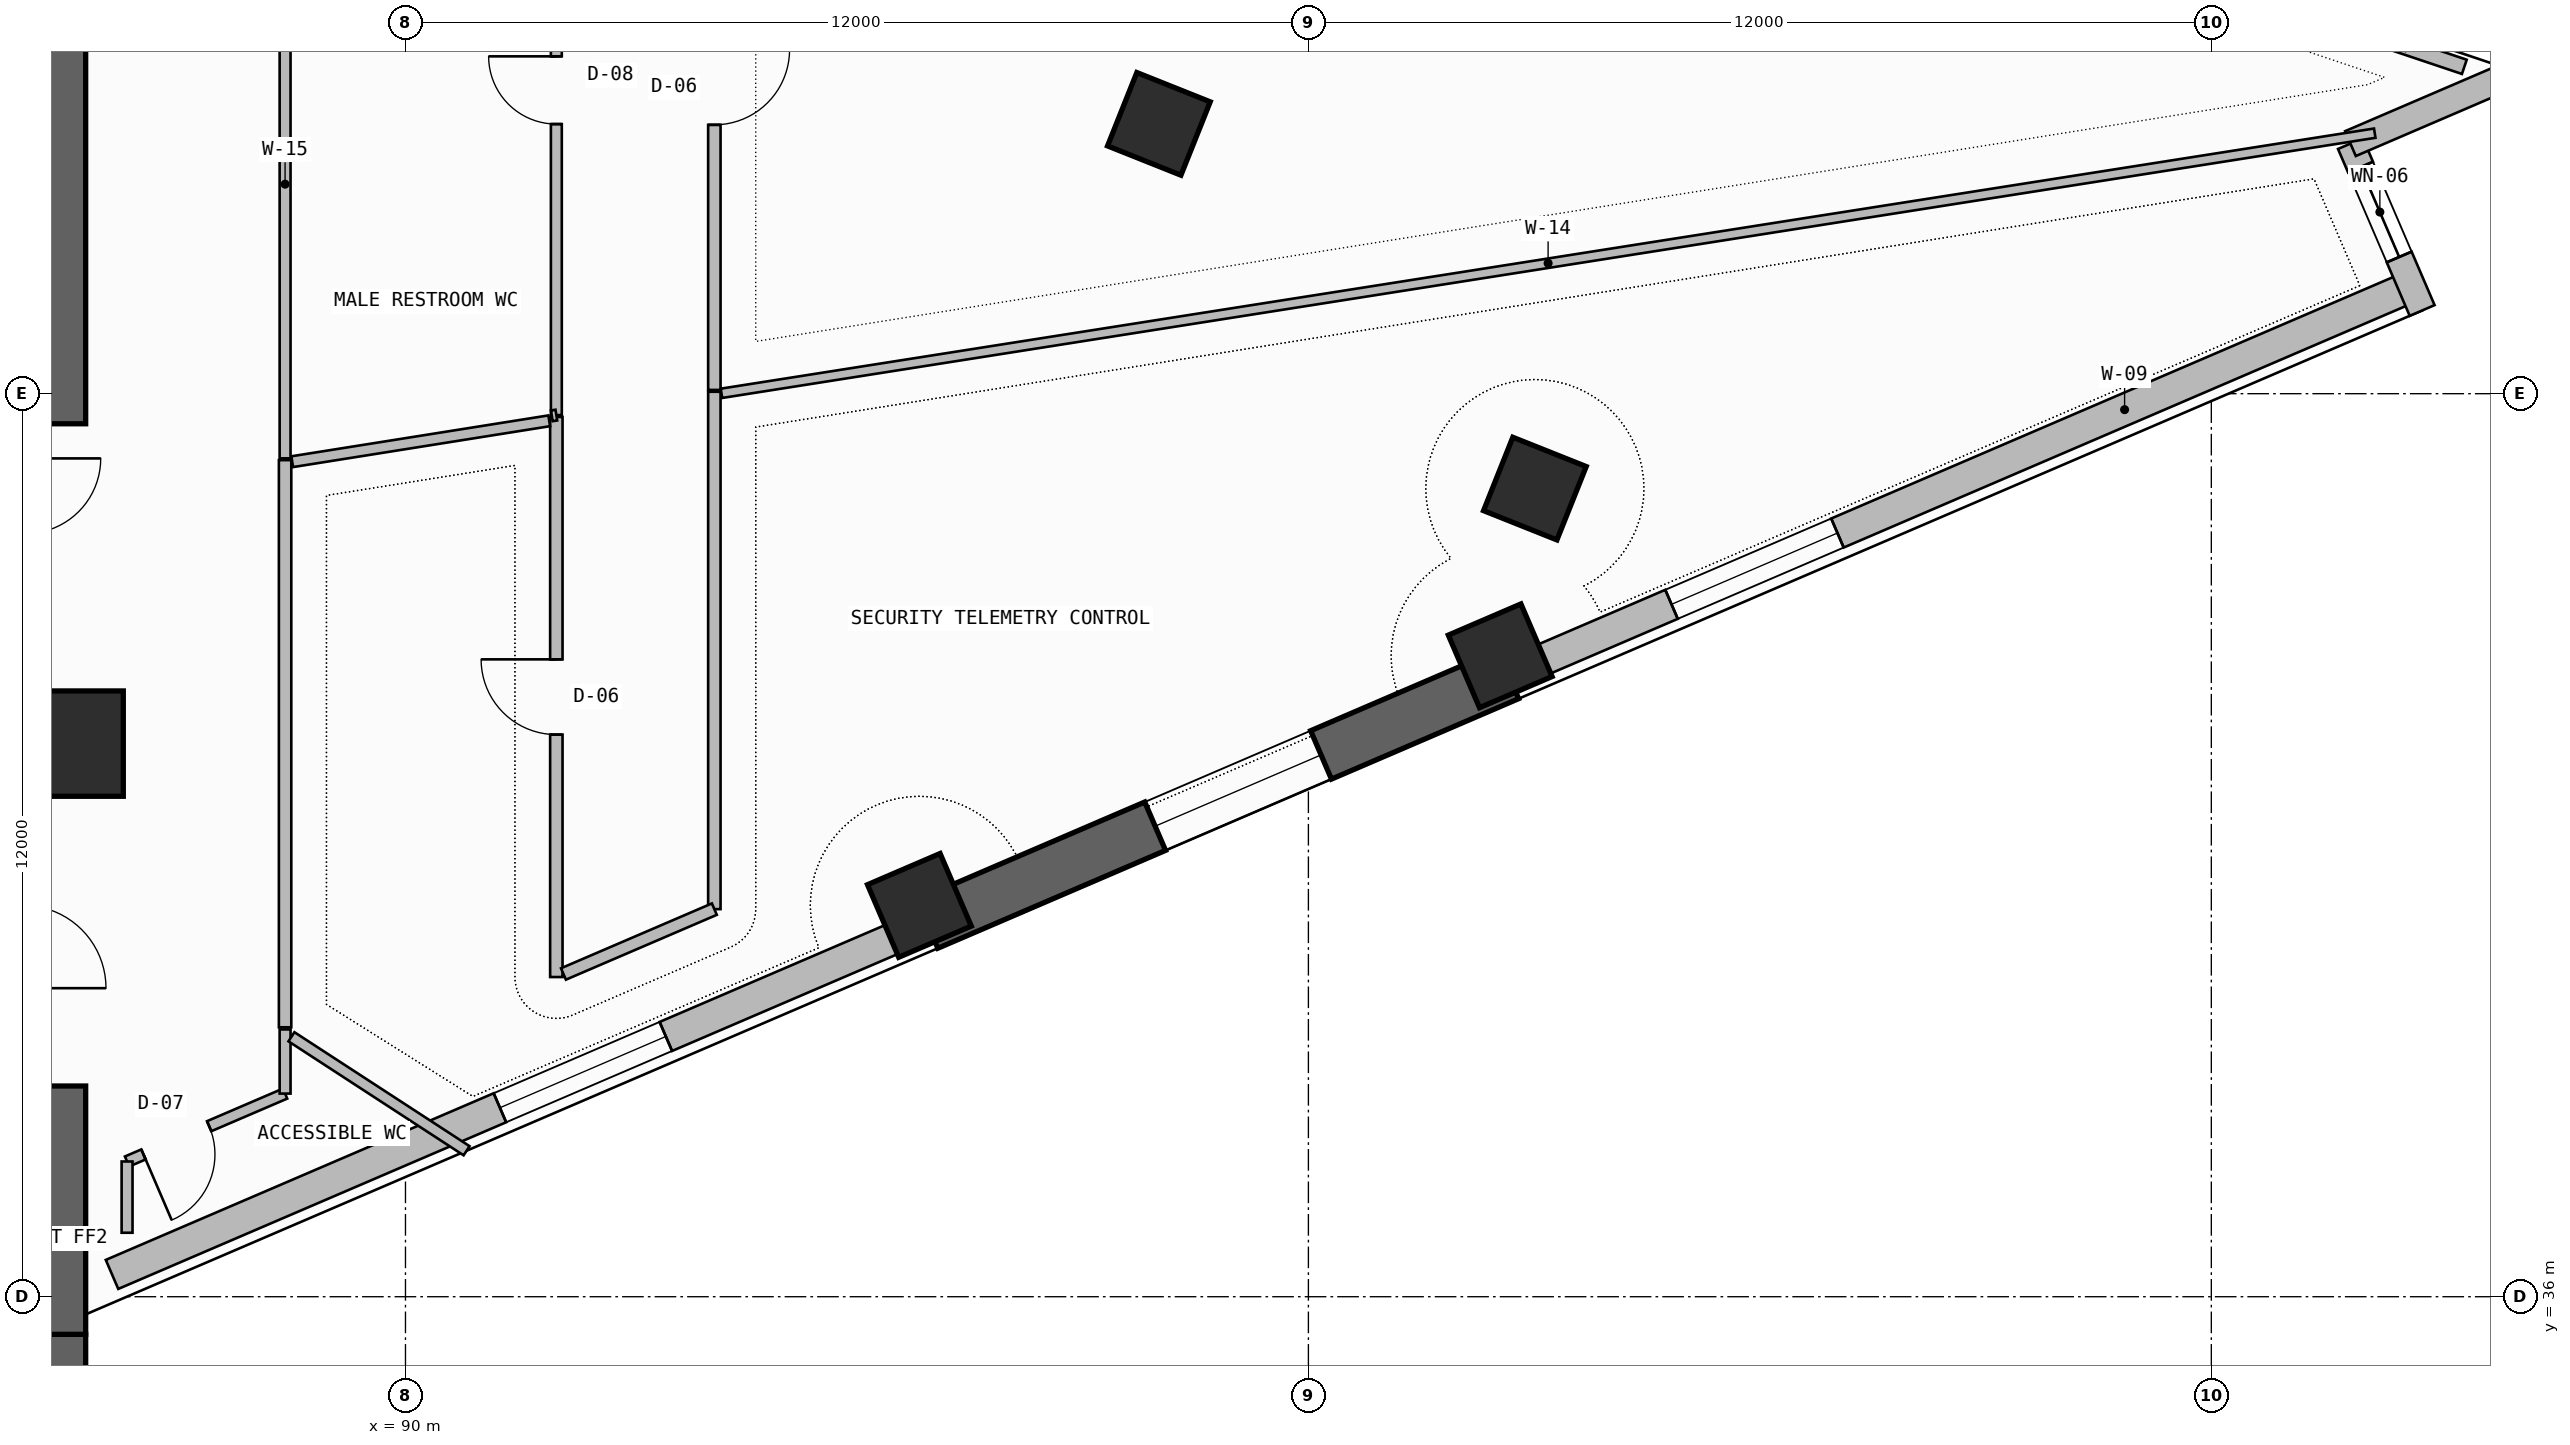
"""IFC4 building model, lengths in metres.
Left out: names, types, materials, properties, quantities, classifications, styles, units other than length and angle.
Written with IfcOpenShell. Run it as: python <this file> out.ifc"""

import sys

from ifc_helpers import new_model, si_unit, direction, frame, frame_2d, origin, origin_2d, place, context, subcontext, project, spatial, rectangle, extrude, element, fill, save


model = new_model("IFC4")
c1 = context("Model", 3, precision=1e-05, world=origin(), true_north=direction((0.0, 1.0)))
c2 = subcontext(c1, "Body", "Model", "MODEL_VIEW")
j1 = project(units=[si_unit("LENGTHUNIT", "METRE"), si_unit("PLANEANGLEUNIT", "RADIAN")], contexts=[c1])
p1 = place(None, origin())
s1 = spatial("IfcSite", under=j1, at=p1, CompositionType="ELEMENT")
p2 = place(p1, origin())
s2 = spatial("IfcBuilding", under=s1, at=p2, CompositionType="ELEMENT")
p3 = place(p2, frame((0.0, 0.0, 179.1)))
s3 = spatial("IfcBuildingStorey", under=s2, at=p3, CompositionType="ELEMENT", Elevation=179.1)
p4 = place(p3, frame((72.15, 35.125, -0.26), z_axis=(0.0, 0.0, 1.0), x_axis=(1.0, 0.0, 0.0)))
e1 = element("IfcWall", 1, at=p4, inside=s3, PredefinedType="SHEAR", context=c2, shape_type="SweptSolid", body=[
    extrude(rectangle(XDim=13.6, YDim=0.75, at=frame_2d((6.8, 0.0))), origin(), (0.0, 0.0, 1.0), 3.52),
])
p5 = place(p3, frame((85.375, 35.5, -0.26), z_axis=(0.0, 0.0, 1.0), x_axis=(0.0, 1.0, 0.0)))
e2 = element("IfcWall", 2, at=p5, inside=s3, PredefinedType="SHEAR", context=c2, shape_type="SweptSolid", body=[
    extrude(rectangle(XDim=3.3, YDim=0.75, at=frame_2d((1.65, 0.0))), origin(), (0.0, 0.0, 1.0), 3.52),
])
p6 = place(p3, frame((85.375, 47.6, -0.26), z_axis=(0.0, 0.0, 1.0), x_axis=(0.0, 1.0, 0.0)))
e3 = element("IfcWall", 3, at=p6, inside=s3, PredefinedType="SHEAR", context=c2, shape_type="SweptSolid", body=[
    extrude(rectangle(XDim=8.45, YDim=0.75, at=frame_2d((4.225, 0.0))), origin(), (0.0, 0.0, 1.0), 3.52),
])
p7 = place(p3, frame((85.55, 43.35, 0.0), z_axis=(0.0, 0.0, 1.0), x_axis=(1.0, 0.0, 0.0)))
e4 = element("IfcColumn", 4, at=p7, inside=s3, PredefinedType="COLUMN", context=c2, shape_type="SweptSolid", body=[
    extrude(rectangle(XDim=1.4, YDim=1.4, at=origin_2d()), origin(), (0.0, 0.0, 1.0), 3.52),
])
for number, where, z_axis, x_axis in (
    (5, (96.83, 41.2, 0.0), (0.0, 0.0, 1.0), (0.919, 0.395, 0.0)),
    (6, (104.549, 44.517, 0.0), (0.0, 0.0, 1.0), (0.919, 0.395, 0.0)),
    (7, (105.01, 46.739, 0.0), (0.0, 0.0, 1.0), (0.371, 0.929, 0.0)),
    (8, (100.013, 51.585, 0.0), (0.0, 0.0, 1.0), (0.371, 0.929, 0.0)),
):
    element("IfcColumn", number, at=place(p3, frame(where, z_axis=z_axis, x_axis=x_axis)), inside=s3, PredefinedType="COLUMN", context=c2, shape_type="SweptSolid", body=[
        extrude(rectangle(XDim=1.05, YDim=1.05, at=origin_2d()), origin(), (0.0, 0.0, 1.0), 3.52),
    ])
p8 = place(p3, frame((86.1, 36.296, 0.0), z_axis=(0.0, 0.0, 1.0), x_axis=(0.918792412723, 0.394741057306, 0.0)))
e9 = element("IfcWall", 9, at=p8, inside=s3, PredefinedType="SOLIDWALL", context=c2, shape_type="SweptSolid", body=[
    extrude(rectangle(XDim=11.794, YDim=0.42, at=frame_2d((5.897, 0.0))), origin(), (0.0, 0.0, 1.0), 2.245),
])
p9 = place(p8, frame((5.611, 0.0, 1.2)))
e10 = element("IfcOpeningElement", 10, at=p9, cuts=e9, PredefinedType="OPENING", context=c2, shape_type="SweptSolid", body=[
    extrude(rectangle(XDim=2.4, YDim=0.9, at=frame_2d((1.2, 0.45))), frame((0.0, 0.22, 0.0), z_axis=(0.0, -1.0, 0.0), x_axis=(1.0, 0.0, 0.0)), (0.0, 0.0, 1.0), 0.44),
])
p10 = place(p3, frame((96.937, 40.952, -0.26), z_axis=(0.0, 0.0, 1.0), x_axis=(0.918782407933, 0.394764343468, 0.0)))
e11 = element("IfcWall", 11, at=p10, inside=s3, PredefinedType="SHEAR", context=c2, shape_type="SweptSolid", body=[
    extrude(rectangle(XDim=8.402, YDim=0.7, at=frame_2d((4.201, 0.0))), origin(), (0.0, 0.0, 1.0), 3.52),
])
p11 = place(p10, frame((3.294, 0.0, 1.2)))
e12 = element("IfcOpeningElement", 12, at=p11, cuts=e11, PredefinedType="OPENING", context=c2, shape_type="SweptSolid", body=[
    extrude(rectangle(XDim=2.4, YDim=0.9, at=frame_2d((1.2, 0.45))), frame((0.0, 0.36, 0.0), z_axis=(0.0, -1.0, 0.0), x_axis=(1.0, 0.0, 0.0)), (0.0, 0.0, 1.0), 0.72),
])
p12 = place(p3, frame((104.656, 44.269, 0.0), z_axis=(0.0, 0.0, 1.0), x_axis=(0.918789071809, 0.394748833467, 0.0)))
e13 = element("IfcWall", 13, at=p12, inside=s3, PredefinedType="SOLIDWALL", context=c2, shape_type="SweptSolid", body=[
    extrude(rectangle(XDim=13.069, YDim=0.42, at=frame_2d((6.534, 0.0))), origin(), (0.0, 0.0, 1.0), 2.245),
])
p13 = place(p12, frame((2.362, 0.0, 1.2)))
e14 = element("IfcOpeningElement", 14, at=p13, cuts=e13, PredefinedType="OPENING", context=c2, shape_type="SweptSolid", body=[
    extrude(rectangle(XDim=2.4, YDim=0.9, at=frame_2d((1.2, 0.45))), frame((0.0, 0.22, 0.0), z_axis=(0.0, -1.0, 0.0), x_axis=(1.0, 0.0, 0.0)), (0.0, 0.0, 1.0), 0.44),
])
p14 = place(p3, frame((116.802, 49.106, 0.0), z_axis=(0.0, 0.0, 1.0), x_axis=(-0.394712707157, 0.918804592288, 0.0)))
e15 = element("IfcWall", 15, at=p14, inside=s3, PredefinedType="SOLIDWALL", context=c2, shape_type="SweptSolid", body=[
    extrude(rectangle(XDim=2.414, YDim=0.36, at=frame_2d((1.207, 0.0))), origin(), (0.0, 0.0, 1.0), 3.26),
])
p15 = place(p14, frame((0.773, 0.0, 0.45)))
e16 = element("IfcOpeningElement", 16, at=p15, cuts=e15, PredefinedType="OPENING", context=c2, shape_type="SweptSolid", body=[
    extrude(rectangle(XDim=1.3, YDim=2.4, at=frame_2d((0.65, 1.2))), frame((0.0, 0.19, 0.0), z_axis=(0.0, -1.0, 0.0), x_axis=(1.0, 0.0, 0.0)), (0.0, 0.0, 1.0), 0.38),
])
p16 = place(p3, frame((115.849, 51.323, 0.0), z_axis=(0.0, 0.0, 1.0), x_axis=(0.918788830096, 0.394749396062, 0.0)))
e17 = element("IfcWall", 17, at=p16, inside=s3, PredefinedType="SOLIDWALL", context=c2, shape_type="SweptSolid", body=[
    extrude(rectangle(XDim=2.413, YDim=0.36, at=frame_2d((1.207, 0.0))), origin(), (0.0, 0.0, 1.0), 3.26),
])
p17 = place(p3, frame((117.363, 52.344, 0.0), z_axis=(0.0, 0.0, 1.0), x_axis=(-0.94800468727, 0.31825636351, 0.0)))
e18 = element("IfcWall", 18, at=p17, inside=s3, PredefinedType="PARAPET", context=c2, shape_type="SweptSolid", body=[
    extrude(rectangle(XDim=31.869, YDim=0.2, at=frame_2d((15.935, 0.0))), origin(), (0.0, 0.0, 1.0), 1.15),
])
p18 = place(p3, frame((86.3, 37.797, 0.0), z_axis=(0.0, 0.0, 1.0), x_axis=(0.918802105609, 0.39471849555, 0.0)))
e19 = element("IfcWall", 19, at=p18, inside=s3, PredefinedType="PARTITIONING", context=c2, shape_type="SweptSolid", body=[
    extrude(rectangle(XDim=2.285, YDim=0.145, at=frame_2d((1.143, 0.0))), origin(), (0.0, 0.0, 1.0), 3.26),
])
p19 = place(p18, frame((0.237, 0.0, 0.0)))
e20 = element("IfcOpeningElement", 20, at=p19, cuts=e19, PredefinedType="OPENING", context=c2, shape_type="SweptSolid", body=[
    extrude(rectangle(XDim=0.95, YDim=2.15, at=frame_2d((0.475, 1.075))), frame((0.0, 0.083, 0.0), z_axis=(0.0, -1.0, 0.0), x_axis=(1.0, 0.0, 0.0)), (0.0, 0.0, 1.0), 0.165),
])
p20 = place(p3, frame((88.4, 38.699, 0.0), z_axis=(0.0, 0.0, 1.0), x_axis=(0.0, 1.0, 0.0)))
e21 = element("IfcWall", 21, at=p20, inside=s3, PredefinedType="PARTITIONING", context=c2, shape_type="SweptSolid", body=[
    extrude(rectangle(XDim=0.853, YDim=0.145, at=frame_2d((0.426, 0.0))), origin(), (0.0, 0.0, 1.0), 3.26),
])
p21 = place(p3, frame((88.485, 39.455, 0.0), z_axis=(0.0, 0.0, 1.0), x_axis=(0.838126135921, -0.545476470882, 0.0)))
e22 = element("IfcWall", 22, at=p21, inside=s3, PredefinedType="PARTITIONING", context=c2, shape_type="SweptSolid", body=[
    extrude(rectangle(XDim=2.777, YDim=0.145, at=frame_2d((1.389, 0.0))), origin(), (0.0, 0.0, 1.0), 3.26),
])
p22 = place(p3, frame((88.4, 39.58, 0.0), z_axis=(0.0, 0.0, 1.0), x_axis=(0.0, 1.0, 0.0)))
e23 = element("IfcWall", 23, at=p22, inside=s3, PredefinedType="PARTITIONING", context=c2, shape_type="SweptSolid", body=[
    extrude(rectangle(XDim=7.537, YDim=0.165, at=frame_2d((3.768, 0.0))), origin(), (0.0, 0.0, 1.0), 2.745),
])
p23 = place(p3, frame((92.005, 47.691, 0.0), z_axis=(0.0, 0.0, 1.0), x_axis=(0.0, -1.0, 0.0)))
e24 = element("IfcWall", 24, at=p23, inside=s3, PredefinedType="PARTITIONING", context=c2, shape_type="SweptSolid", body=[
    extrude(rectangle(XDim=7.443, YDim=0.165, at=frame_2d((3.722, 0.0))), origin(), (0.0, 0.0, 1.0), 2.745),
])
p24 = place(p23, frame((3.221, 0.0, 0.0)))
e25 = element("IfcOpeningElement", 25, at=p24, cuts=e24, PredefinedType="OPENING", context=c2, shape_type="SweptSolid", body=[
    extrude(rectangle(XDim=1.0, YDim=2.2, at=frame_2d((0.5, 1.1))), frame((0.0, 0.093, 0.0), z_axis=(0.0, -1.0, 0.0), x_axis=(1.0, 0.0, 0.0)), (0.0, 0.0, 1.0), 0.185),
])
p25 = place(p3, frame((94.105, 41.15, 0.0), z_axis=(0.0, 0.0, 1.0), x_axis=(0.0, 1.0, 0.0)))
e26 = element("IfcWall", 26, at=p25, inside=s3, PredefinedType="PARTITIONING", context=c2, shape_type="SweptSolid", body=[
    extrude(rectangle(XDim=6.875, YDim=0.165, at=frame_2d((3.438, 0.0))), origin(), (0.0, 0.0, 1.0), 2.745),
])
p26 = place(p3, frame((92.1, 40.289, 0.0), z_axis=(0.0, 0.0, 1.0), x_axis=(0.918791733635, 0.394742637935, 0.0)))
e27 = element("IfcWall", 27, at=p26, inside=s3, PredefinedType="PARTITIONING", context=c2, shape_type="SweptSolid", body=[
    extrude(rectangle(XDim=2.183, YDim=0.165, at=frame_2d((1.091, 0.0))), origin(), (0.0, 0.0, 1.0), 3.26),
])
p27 = place(p3, frame((94.199, 48.005, 0.0), z_axis=(0.0, 0.0, 1.0), x_axis=(0.987847987509, 0.155423143625, 0.0)))
e28 = element("IfcWall", 28, at=p27, inside=s3, PredefinedType="PARTITIONING", context=c2, shape_type="SweptSolid", body=[
    extrude(rectangle(XDim=22.243, YDim=0.125, at=frame_2d((11.121, 0.0))), origin(), (0.0, 0.0, 1.0), 2.245),
])
p28 = place(p3, frame((88.494, 47.096, 0.0), z_axis=(0.0, 0.0, 1.0), x_axis=(0.987580306335, 0.157115048735, 0.0)))
e29 = element("IfcWall", 29, at=p28, inside=s3, PredefinedType="PARTITIONING", context=c2, shape_type="SweptSolid", body=[
    extrude(rectangle(XDim=3.459, YDim=0.145, at=frame_2d((1.729, 0.0))), origin(), (0.0, 0.0, 1.0), 3.26),
])
p29 = place(p3, frame((94.105, 48.05, 0.0), z_axis=(0.0, 0.0, 1.0), x_axis=(0.0, 1.0, 0.0)))
e30 = element("IfcWall", 30, at=p29, inside=s3, PredefinedType="PARTITIONING", context=c2, shape_type="SweptSolid", body=[
    extrude(rectangle(XDim=10.894, YDim=0.165, at=frame_2d((5.447, 0.0))), origin(), (0.0, 0.0, 1.0), 2.645),
])
p30 = place(p29, frame((3.523, 0.0, 0.0)))
e31 = element("IfcOpeningElement", 31, at=p30, cuts=e30, PredefinedType="OPENING", context=c2, shape_type="SweptSolid", body=[
    extrude(rectangle(XDim=1.0, YDim=2.2, at=frame_2d((0.5, 1.1))), frame((0.0, 0.093, 0.0), z_axis=(0.0, -1.0, 0.0), x_axis=(1.0, 0.0, 0.0)), (0.0, 0.0, 1.0), 0.185),
])
p31 = place(p3, frame((92.005, 56.35, 0.0), z_axis=(0.0, 0.0, 1.0), x_axis=(0.0, -1.0, 0.0)))
e32 = element("IfcWall", 32, at=p31, inside=s3, PredefinedType="PARTITIONING", context=c2, shape_type="SweptSolid", body=[
    extrude(rectangle(XDim=8.635, YDim=0.145, at=frame_2d((4.317, 0.0))), origin(), (0.0, 0.0, 1.0), 2.745),
])
p32 = place(p31, frame((3.867, 0.0, 0.0)))
e33 = element("IfcOpeningElement", 33, at=p32, cuts=e32, PredefinedType="OPENING", context=c2, shape_type="SweptSolid", body=[
    extrude(rectangle(XDim=0.9, YDim=2.1, at=frame_2d((0.45, 1.05))), frame((0.0, 0.083, 0.0), z_axis=(0.0, -1.0, 0.0), x_axis=(1.0, 0.0, 0.0)), (0.0, 0.0, 1.0), 0.165),
])
p33 = place(p3, frame((88.4, 47.141, 0.0), z_axis=(0.0, 0.0, 1.0), x_axis=(0.0, 1.0, 0.0)))
e34 = element("IfcWall", 34, at=p33, inside=s3, PredefinedType="PARTITIONING", context=c2, shape_type="SweptSolid", body=[
    extrude(rectangle(XDim=7.286, YDim=0.145, at=frame_2d((3.643, 0.0))), origin(), (0.0, 0.0, 1.0), 3.26),
])
p34 = place(p3, frame((92.005, 47.715, 0.0), z_axis=(0.0, 0.0, 1.0), x_axis=(-0.987566087596, -0.157204397617, 0.0)))
e35 = element("IfcWall", 35, at=p34, inside=s3, PredefinedType="PARTITIONING", context=c2, shape_type="SweptSolid", body=[
    extrude(rectangle(XDim=0.061, YDim=0.145, at=frame_2d((0.03, 0.0))), origin(), (0.0, 0.0, 1.0), 3.26),
])
p35 = place(p3, frame((86.3, 36.85, 0.0), z_axis=(0.0, 0.0, 1.0), x_axis=(0.0, 1.0, 0.0)))
e36 = element("IfcWall", 36, at=p35, inside=s3, PredefinedType="PARTITIONING", context=c2, shape_type="SweptSolid", body=[
    extrude(rectangle(XDim=0.947, YDim=0.145, at=frame_2d((0.474, 0.0))), origin(), (0.0, 0.0, 1.0), 3.26),
])
p36 = place(p9, origin())
e37 = element("IfcWindow", 37, at=p36, inside=s3, PartitioningType="SINGLE_PANEL", PredefinedType="WINDOW", context=c2, shape_type="SweptSolid", body=[
    extrude(rectangle(XDim=2.4, YDim=0.9, at=frame_2d((1.2, 0.45))), frame((0.0, 0.03, 0.0), z_axis=(0.0, -1.0, 0.0), x_axis=(1.0, 0.0, 0.0)), (0.0, 0.0, 1.0), 0.06),
])
fill(e10, e37)
p37 = place(p11, origin())
e38 = element("IfcWindow", 38, at=p37, inside=s3, PartitioningType="SINGLE_PANEL", PredefinedType="WINDOW", context=c2, shape_type="SweptSolid", body=[
    extrude(rectangle(XDim=2.4, YDim=0.9, at=frame_2d((1.2, 0.45))), frame((0.0, 0.03, 0.0), z_axis=(0.0, -1.0, 0.0), x_axis=(1.0, 0.0, 0.0)), (0.0, 0.0, 1.0), 0.06),
])
fill(e12, e38)
p38 = place(p13, origin())
e39 = element("IfcWindow", 39, at=p38, inside=s3, PartitioningType="SINGLE_PANEL", PredefinedType="WINDOW", context=c2, shape_type="SweptSolid", body=[
    extrude(rectangle(XDim=2.4, YDim=0.9, at=frame_2d((1.2, 0.45))), frame((0.0, 0.03, 0.0), z_axis=(0.0, -1.0, 0.0), x_axis=(1.0, 0.0, 0.0)), (0.0, 0.0, 1.0), 0.06),
])
fill(e14, e39)
p39 = place(p15, origin())
e40 = element("IfcWindow", 40, at=p39, inside=s3, PartitioningType="SINGLE_PANEL", PredefinedType="WINDOW", context=c2, shape_type="SweptSolid", body=[
    extrude(rectangle(XDim=1.3, YDim=2.4, at=frame_2d((0.65, 1.2))), frame((0.0, 0.03, 0.0), z_axis=(0.0, -1.0, 0.0), x_axis=(1.0, 0.0, 0.0)), (0.0, 0.0, 1.0), 0.06),
])
fill(e16, e40)
p40 = place(p19, frame((0.95, 0.0, 0.0), z_axis=(0.0, 0.0, 1.0), x_axis=(-1.0, 0.0, 0.0)))
e41 = element("IfcDoor", 41, at=p40, inside=s3, OperationType="SINGLE_SWING_RIGHT", PredefinedType="DOOR", context=c2, shape_type="SweptSolid", body=[
    extrude(rectangle(XDim=0.95, YDim=2.15, at=frame_2d((0.475, 1.075))), frame((0.0, 0.025, 0.0), z_axis=(0.0, -1.0, 0.0), x_axis=(1.0, 0.0, 0.0)), (0.0, 0.0, 1.0), 0.05),
])
fill(e20, e41)
p41 = place(p24, frame((1.0, 0.0, 0.0), z_axis=(0.0, 0.0, 1.0), x_axis=(-1.0, 0.0, 0.0)))
e42 = element("IfcDoor", 42, at=p41, inside=s3, OperationType="SINGLE_SWING_RIGHT", PredefinedType="DOOR", context=c2, shape_type="SweptSolid", body=[
    extrude(rectangle(XDim=1.0, YDim=2.2, at=frame_2d((0.5, 1.1))), frame((0.0, 0.025, 0.0), z_axis=(0.0, -1.0, 0.0), x_axis=(1.0, 0.0, 0.0)), (0.0, 0.0, 1.0), 0.05),
])
fill(e25, e42)
p42 = place(p30, frame((1.0, 0.0, 0.0), z_axis=(0.0, 0.0, 1.0), x_axis=(-1.0, 0.0, 0.0)))
e43 = element("IfcDoor", 43, at=p42, inside=s3, OperationType="SINGLE_SWING_LEFT", PredefinedType="DOOR", context=c2, shape_type="SweptSolid", body=[
    extrude(rectangle(XDim=1.0, YDim=2.2, at=frame_2d((0.5, 1.1))), frame((0.0, 0.025, 0.0), z_axis=(0.0, -1.0, 0.0), x_axis=(1.0, 0.0, 0.0)), (0.0, 0.0, 1.0), 0.05),
])
fill(e31, e43)
p43 = place(p32, frame((0.9, 0.0, 0.0), z_axis=(0.0, 0.0, 1.0), x_axis=(-1.0, 0.0, 0.0)))
e44 = element("IfcDoor", 44, at=p43, inside=s3, OperationType="SINGLE_SWING_RIGHT", PredefinedType="DOOR", context=c2, shape_type="SweptSolid", body=[
    extrude(rectangle(XDim=0.9, YDim=2.1, at=frame_2d((0.45, 1.05))), frame((0.0, 0.025, 0.0), z_axis=(0.0, -1.0, 0.0), x_axis=(1.0, 0.0, 0.0)), (0.0, 0.0, 1.0), 0.05),
])
fill(e33, e44)
save(model, sys.argv[1])
